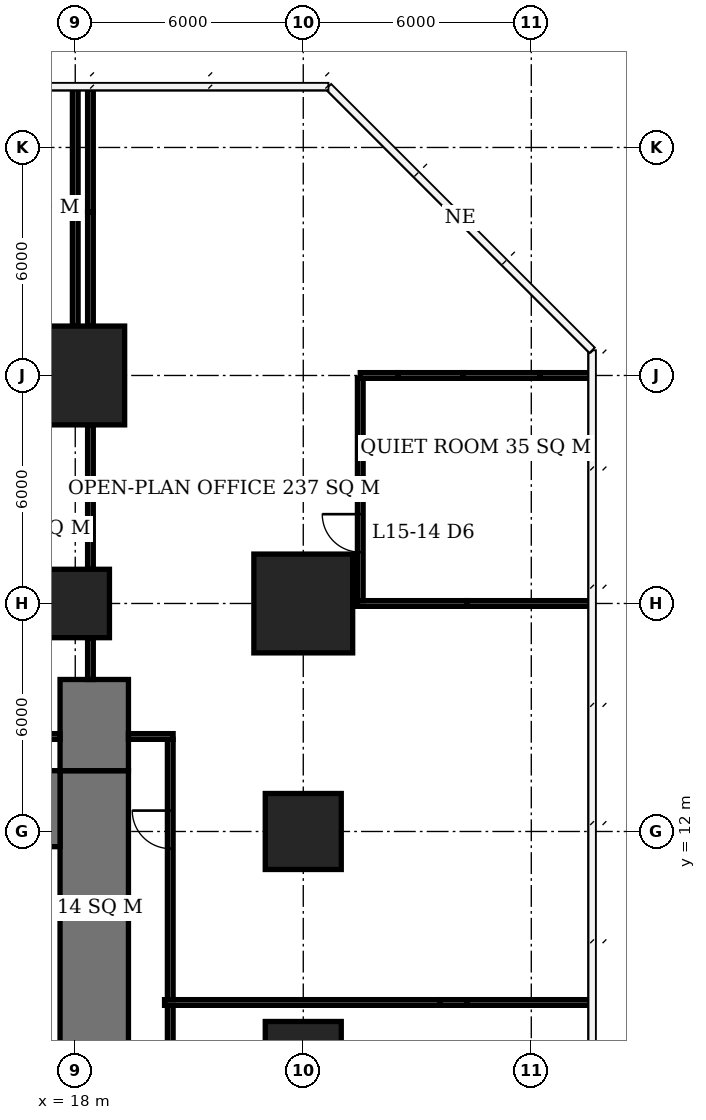
"""IFC4 building model, lengths in metres.
Left out: names, types, materials, properties, quantities, classifications, styles, units other than length and angle.
Written with IfcOpenShell. Run it as: python <this file> out.ifc"""

import sys

from ifc_helpers import new_model, si_unit, direction, frame, frame_2d, origin, origin_2d, place, context, subcontext, project, spatial, rectangle, extrude, element, fill, save


model = new_model("IFC4")
c1 = context("Model", 3, precision=1e-05, world=origin(), true_north=direction((0.0, 1.0)))
c2 = subcontext(c1, "Body", "Model", "MODEL_VIEW")
j1 = project(units=[si_unit("LENGTHUNIT", "METRE"), si_unit("PLANEANGLEUNIT", "RADIAN")], contexts=[c1])
p1 = place(None, origin())
s1 = spatial("IfcSite", under=j1, at=p1, CompositionType="ELEMENT")
p2 = place(p1, origin())
s2 = spatial("IfcBuilding", under=s1, at=p2, CompositionType="ELEMENT")
p3 = place(p2, frame((0.0, 0.0, 65.0)))
s3 = spatial("IfcBuildingStorey", under=s2, at=p3, CompositionType="ELEMENT", Elevation=65.0)
p4 = place(p3, frame((18.0, 18.0, 0.0), z_axis=(0.0, 0.0, 1.0), x_axis=(1.0, 0.0, 0.0)))
e1 = element("IfcColumn", 1, at=p4, inside=s3, PredefinedType="COLUMN", context=c2, shape_type="SweptSolid", body=[
    extrude(rectangle(XDim=1.8, YDim=1.8, at=origin_2d()), origin(), (0.0, 0.0, 1.0), 3.9),
])
p5 = place(p3, frame((18.0, 24.0, 0.0), z_axis=(0.0, 0.0, 1.0), x_axis=(1.0, 0.0, 0.0)))
e2 = element("IfcColumn", 2, at=p5, inside=s3, PredefinedType="COLUMN", context=c2, shape_type="SweptSolid", body=[
    extrude(rectangle(XDim=2.6, YDim=2.6, at=origin_2d()), origin(), (0.0, 0.0, 1.0), 3.9),
])
for number, where, z_axis, x_axis in (
    (3, (24.0, 6.0, 0.0), (0.0, 0.0, 1.0), (1.0, 0.0, 0.0)),
    (4, (24.0, 12.0, 0.0), (0.0, 0.0, 1.0), (1.0, 0.0, 0.0)),
):
    element("IfcColumn", number, at=place(p3, frame(where, z_axis=z_axis, x_axis=x_axis)), inside=s3, PredefinedType="COLUMN", context=c2, shape_type="SweptSolid", body=[
        extrude(rectangle(XDim=2.0, YDim=2.0, at=origin_2d()), origin(), (0.0, 0.0, 1.0), 3.9),
    ])
p6 = place(p3, frame((24.0, 18.0, 0.0), z_axis=(0.0, 0.0, 1.0), x_axis=(1.0, 0.0, 0.0)))
e5 = element("IfcColumn", 5, at=p6, inside=s3, PredefinedType="COLUMN", context=c2, shape_type="SweptSolid", body=[
    extrude(rectangle(XDim=2.6, YDim=2.6, at=origin_2d()), origin(), (0.0, 0.0, 1.0), 3.9),
])
p7 = place(p3, frame((-5.6, 12.6, 0.0), z_axis=(0.0, 0.0, 1.0), x_axis=(1.0, 0.0, 0.0)))
e6 = element("IfcWall", 6, at=p7, inside=s3, PredefinedType="SHEAR", context=c2, shape_type="SweptSolid", body=[
    extrude(rectangle(XDim=23.2, YDim=2.0, at=frame_2d((11.6, 0.0))), origin(), (0.0, 0.0, 1.0), 3.9),
])
p8 = place(p3, frame((18.5, -7.6, 0.0), z_axis=(0.0, 0.0, 1.0), x_axis=(0.0, 1.0, 0.0)))
e7 = element("IfcWall", 7, at=p8, inside=s3, PredefinedType="SHEAR", context=c2, shape_type="SweptSolid", body=[
    extrude(rectangle(XDim=21.2, YDim=1.8, at=frame_2d((10.6, 0.0))), origin(), (0.0, 0.0, 1.0), 3.9),
])
p9 = place(p8, frame((9.2, 0.0, 0.0)))
e8 = element("IfcOpeningElement", 8, at=p9, cuts=e7, PredefinedType="OPENING", context=c2, shape_type="SweptSolid", body=[
    extrude(rectangle(XDim=1.8, YDim=2.4, at=frame_2d((0.9, 1.2))), frame((0.0, 0.91, 0.0), z_axis=(0.0, -1.0, 0.0), x_axis=(1.0, 0.0, 0.0)), (0.0, 0.0, 1.0), 1.82),
])
p10 = place(p3, frame((18.5, 13.6, 0.0), z_axis=(0.0, 0.0, 1.0), x_axis=(0.0, 1.0, 0.0)))
e9 = element("IfcWall", 9, at=p10, inside=s3, PredefinedType="SHEAR", context=c2, shape_type="SweptSolid", body=[
    extrude(rectangle(XDim=2.4, YDim=1.8, at=frame_2d((1.2, 0.0))), origin(), (0.0, 0.0, 1.0), 3.9),
])
p11 = place(p3, frame((25.425, 18.0, 0.0), z_axis=(0.0, 0.0, 1.0), x_axis=(1.0, 0.0, 0.0)))
e10 = element("IfcWall", 10, at=p11, inside=s3, PredefinedType="PARTITIONING", context=c2, shape_type="SweptSolid", body=[
    extrude(rectangle(XDim=2.885, YDim=0.15, at=frame_2d((1.442, 0.0))), origin(), (0.0, 0.0, 1.0), 2.65),
])
p12 = place(p3, frame((28.31, 18.0, 0.0), z_axis=(0.0, 0.0, 1.0), x_axis=(1.0, 0.0, 0.0)))
e11 = element("IfcWall", 11, at=p12, inside=s3, PredefinedType="PARTITIONING", context=c2, shape_type="SweptSolid", body=[
    extrude(rectangle(XDim=3.29, YDim=0.15, at=frame_2d((1.645, 0.0))), origin(), (0.0, 0.0, 1.0), 3.65),
])
p13 = place(p3, frame((25.5, 24.0, 0.0), z_axis=(0.0, 0.0, 1.0), x_axis=(1.0, 0.0, 0.0)))
e12 = element("IfcWall", 12, at=p13, inside=s3, PredefinedType="PARTITIONING", context=c2, shape_type="SweptSolid", body=[
    extrude(rectangle(XDim=0.99, YDim=0.15, at=frame_2d((0.495, 0.0))), origin(), (0.0, 0.0, 1.0), 2.65),
])
p14 = place(p3, frame((26.49, 24.0, 0.0), z_axis=(0.0, 0.0, 1.0), x_axis=(1.0, 0.0, 0.0)))
e13 = element("IfcWall", 13, at=p14, inside=s3, PredefinedType="PARTITIONING", context=c2, shape_type="SweptSolid", body=[
    extrude(rectangle(XDim=1.718, YDim=0.15, at=frame_2d((0.859, 0.0))), origin(), (0.0, 0.0, 1.0), 3.65),
])
p15 = place(p3, frame((28.208, 24.0, 0.0), z_axis=(0.0, 0.0, 1.0), x_axis=(1.0, 0.0, 0.0)))
e14 = element("IfcWall", 14, at=p15, inside=s3, PredefinedType="PARTITIONING", context=c2, shape_type="SweptSolid", body=[
    extrude(rectangle(XDim=2.029, YDim=0.15, at=frame_2d((1.015, 0.0))), origin(), (0.0, 0.0, 1.0), 2.65),
])
p16 = place(p3, frame((30.237, 24.0, 0.0), z_axis=(0.0, 0.0, 1.0), x_axis=(1.0, 0.0, 0.0)))
e15 = element("IfcWall", 15, at=p16, inside=s3, PredefinedType="PARTITIONING", context=c2, shape_type="SweptSolid", body=[
    extrude(rectangle(XDim=1.363, YDim=0.15, at=frame_2d((0.682, 0.0))), origin(), (0.0, 0.0, 1.0), 3.65),
])
p17 = place(p3, frame((18.0, 25.3, 0.0), z_axis=(0.0, 0.0, 1.0), x_axis=(0.0, 1.0, 0.0)))
e16 = element("IfcWall", 16, at=p17, inside=s3, PredefinedType="PARTITIONING", context=c2, shape_type="SweptSolid", body=[
    extrude(rectangle(XDim=3.01, YDim=0.15, at=frame_2d((1.505, 0.0))), origin(), (0.0, 0.0, 1.0), 2.65),
])
p18 = place(p3, frame((18.0, 28.31, 0.0), z_axis=(0.0, 0.0, 1.0), x_axis=(0.0, 1.0, 0.0)))
e17 = element("IfcWall", 17, at=p18, inside=s3, PredefinedType="PARTITIONING", context=c2, shape_type="SweptSolid", body=[
    extrude(rectangle(XDim=3.29, YDim=0.15, at=frame_2d((1.645, 0.0))), origin(), (0.0, 0.0, 1.0), 3.65),
])
p19 = place(p3, frame((25.5, 18.075, 0.0), z_axis=(0.0, 0.0, 1.0), x_axis=(0.0, 1.0, 0.0)))
e18 = element("IfcWall", 18, at=p19, inside=s3, PredefinedType="PARTITIONING", context=c2, shape_type="SweptSolid", body=[
    extrude(rectangle(XDim=3.217, YDim=0.15, at=frame_2d((1.608, 0.0))), origin(), (0.0, 0.0, 1.0), 2.65),
])
p20 = place(p19, frame((1.275, 0.0, 0.0)))
e19 = element("IfcOpeningElement", 19, at=p20, cuts=e18, PredefinedType="OPENING", context=c2, shape_type="SweptSolid", body=[
    extrude(rectangle(XDim=1.0, YDim=2.1, at=frame_2d((0.5, 1.05))), frame((0.0, 0.085, 0.0), z_axis=(0.0, -1.0, 0.0), x_axis=(1.0, 0.0, 0.0)), (0.0, 0.0, 1.0), 0.17),
])
p21 = place(p3, frame((25.5, 21.292, 0.0), z_axis=(0.0, 0.0, 1.0), x_axis=(0.0, 1.0, 0.0)))
e20 = element("IfcWall", 20, at=p21, inside=s3, PredefinedType="PARTITIONING", context=c2, shape_type="SweptSolid", body=[
    extrude(rectangle(XDim=2.643, YDim=0.15, at=frame_2d((1.322, 0.0))), origin(), (0.0, 0.0, 1.0), 3.65),
])
p22 = place(p3, frame((10.575, 14.5, 0.0), z_axis=(0.0, 0.0, 1.0), x_axis=(1.0, 0.0, 0.0)))
e21 = element("IfcWall", 21, at=p22, inside=s3, PredefinedType="PARTITIONING", context=c2, shape_type="SweptSolid", body=[
    extrude(rectangle(XDim=7.025, YDim=0.15, at=frame_2d((3.513, 0.0))), origin(), (0.0, 0.0, 1.0), 3.65),
])
p23 = place(p22, frame((4.04, 0.0, 0.0)))
e22 = element("IfcOpeningElement", 22, at=p23, cuts=e21, PredefinedType="OPENING", context=c2, shape_type="SweptSolid", body=[
    extrude(rectangle(XDim=1.0, YDim=2.1, at=frame_2d((0.5, 1.05))), frame((0.0, 0.085, 0.0), z_axis=(0.0, -1.0, 0.0), x_axis=(1.0, 0.0, 0.0)), (0.0, 0.0, 1.0), 0.17),
])
p24 = place(p3, frame((18.4, 16.0, 0.0), z_axis=(0.0, 0.0, 1.0), x_axis=(0.0, 1.0, 0.0)))
e23 = element("IfcWall", 23, at=p24, inside=s3, PredefinedType="PARTITIONING", context=c2, shape_type="SweptSolid", body=[
    extrude(rectangle(XDim=1.1, YDim=0.15, at=frame_2d((0.55, 0.0))), origin(), (0.0, 0.0, 1.0), 3.65),
])
p25 = place(p3, frame((18.4, 18.9, 0.0), z_axis=(0.0, 0.0, 1.0), x_axis=(0.0, 1.0, 0.0)))
e24 = element("IfcWall", 24, at=p25, inside=s3, PredefinedType="PARTITIONING", context=c2, shape_type="SweptSolid", body=[
    extrude(rectangle(XDim=3.8, YDim=0.15, at=frame_2d((1.9, 0.0))), origin(), (0.0, 0.0, 1.0), 3.65),
])
p26 = place(p3, frame((18.4, 25.3, 0.0), z_axis=(0.0, 0.0, 1.0), x_axis=(0.0, 1.0, 0.0)))
e25 = element("IfcWall", 25, at=p26, inside=s3, PredefinedType="PARTITIONING", context=c2, shape_type="SweptSolid", body=[
    extrude(rectangle(XDim=3.01, YDim=0.15, at=frame_2d((1.505, 0.0))), origin(), (0.0, 0.0, 1.0), 2.65),
])
p27 = place(p3, frame((18.4, 28.31, 0.0), z_axis=(0.0, 0.0, 1.0), x_axis=(0.0, 1.0, 0.0)))
e26 = element("IfcWall", 26, at=p27, inside=s3, PredefinedType="PARTITIONING", context=c2, shape_type="SweptSolid", body=[
    extrude(rectangle(XDim=3.24, YDim=0.15, at=frame_2d((1.62, 0.0))), origin(), (0.0, 0.0, 1.0), 3.65),
])
p28 = place(p3, frame((19.4, 14.5, 0.0), z_axis=(0.0, 0.0, 1.0), x_axis=(1.0, 0.0, 0.0)))
e27 = element("IfcWall", 27, at=p28, inside=s3, PredefinedType="PARTITIONING", context=c2, shape_type="SweptSolid", body=[
    extrude(rectangle(XDim=1.175, YDim=0.15, at=frame_2d((0.587, 0.0))), origin(), (0.0, 0.0, 1.0), 3.65),
])
p29 = place(p3, frame((20.5, -4.425, 0.0), z_axis=(0.0, 0.0, 1.0), x_axis=(0.0, 1.0, 0.0)))
e28 = element("IfcWall", 28, at=p29, inside=s3, PredefinedType="PARTITIONING", context=c2, shape_type="SweptSolid", body=[
    extrude(rectangle(XDim=11.85, YDim=0.15, at=frame_2d((5.925, 0.0))), origin(), (0.0, 0.0, 1.0), 3.65),
])
p30 = place(p29, frame((7.225, 0.0, 0.0)))
e29 = element("IfcOpeningElement", 29, at=p30, cuts=e28, PredefinedType="OPENING", context=c2, shape_type="SweptSolid", body=[
    extrude(rectangle(XDim=1.0, YDim=2.1, at=frame_2d((0.5, 1.05))), frame((0.0, 0.085, 0.0), z_axis=(0.0, -1.0, 0.0), x_axis=(1.0, 0.0, 0.0)), (0.0, 0.0, 1.0), 0.17),
])
p31 = place(p3, frame((20.5, 7.575, 0.0), z_axis=(0.0, 0.0, 1.0), x_axis=(0.0, 1.0, 0.0)))
e30 = element("IfcWall", 30, at=p31, inside=s3, PredefinedType="PARTITIONING", context=c2, shape_type="SweptSolid", body=[
    extrude(rectangle(XDim=6.85, YDim=0.15, at=frame_2d((3.425, 0.0))), origin(), (0.0, 0.0, 1.0), 3.65),
])
p32 = place(p31, frame((3.975, 0.0, 0.0)))
e31 = element("IfcOpeningElement", 31, at=p32, cuts=e30, PredefinedType="OPENING", context=c2, shape_type="SweptSolid", body=[
    extrude(rectangle(XDim=1.0, YDim=2.1, at=frame_2d((0.5, 1.05))), frame((0.0, 0.085, 0.0), z_axis=(0.0, -1.0, 0.0), x_axis=(1.0, 0.0, 0.0)), (0.0, 0.0, 1.0), 0.17),
])
p33 = place(p3, frame((20.35, 7.5, 0.0), z_axis=(0.0, 0.0, 1.0), x_axis=(1.0, 0.0, 0.0)))
e32 = element("IfcWall", 32, at=p33, inside=s3, PredefinedType="PARTITIONING", context=c2, shape_type="SweptSolid", body=[
    extrude(rectangle(XDim=7.24, YDim=0.15, at=frame_2d((3.62, 0.0))), origin(), (0.0, 0.0, 1.0), 3.65),
])
p34 = place(p3, frame((27.59, 7.5, 0.0), z_axis=(0.0, 0.0, 1.0), x_axis=(1.0, 0.0, 0.0)))
e33 = element("IfcWall", 33, at=p34, inside=s3, PredefinedType="PARTITIONING", context=c2, shape_type="SweptSolid", body=[
    extrude(rectangle(XDim=0.72, YDim=0.15, at=frame_2d((0.36, 0.0))), origin(), (0.0, 0.0, 1.0), 2.65),
])
p35 = place(p3, frame((28.31, 7.5, 0.0), z_axis=(0.0, 0.0, 1.0), x_axis=(1.0, 0.0, 0.0)))
e34 = element("IfcWall", 34, at=p35, inside=s3, PredefinedType="PARTITIONING", context=c2, shape_type="SweptSolid", body=[
    extrude(rectangle(XDim=3.29, YDim=0.15, at=frame_2d((1.645, 0.0))), origin(), (0.0, 0.0, 1.0), 3.65),
])
p36 = place(p20, origin())
e35 = element("IfcDoor", 35, at=p36, inside=s3, OperationType="SINGLE_SWING_RIGHT", PredefinedType="DOOR", context=c2, shape_type="SweptSolid", body=[
    extrude(rectangle(XDim=1.0, YDim=2.1, at=frame_2d((0.5, 1.05))), frame((0.0, 0.025, 0.0), z_axis=(0.0, -1.0, 0.0), x_axis=(1.0, 0.0, 0.0)), (0.0, 0.0, 1.0), 0.05),
])
fill(e19, e35)
p37 = place(p32, origin())
e36 = element("IfcDoor", 36, at=p37, inside=s3, OperationType="SINGLE_SWING_RIGHT", PredefinedType="DOOR", context=c2, shape_type="SweptSolid", body=[
    extrude(rectangle(XDim=1.0, YDim=2.1, at=frame_2d((0.5, 1.05))), frame((0.0, 0.025, 0.0), z_axis=(0.0, -1.0, 0.0), x_axis=(1.0, 0.0, 0.0)), (0.0, 0.0, 1.0), 0.05),
])
fill(e31, e36)
save(model, sys.argv[1])
